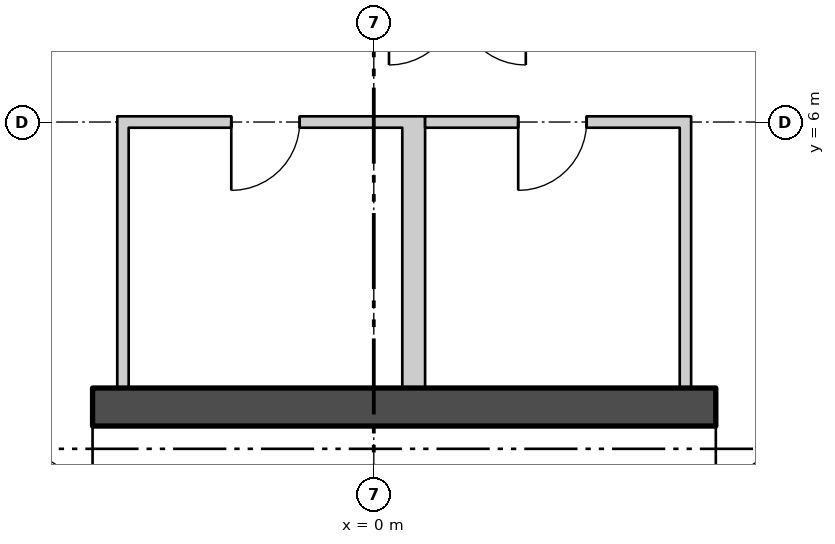
"""IFC4 building model, lengths in metres.
Left out: names, types, materials, properties, quantities, classifications, styles, units other than length and angle.
Written with IfcOpenShell. Run it as: python <this file> out.ifc"""

import sys

from ifc_helpers import new_model, si_unit, direction, frame, frame_2d, origin, place, context, subcontext, project, spatial, polyline, rectangle, outline, extrude, element, fill, save


model = new_model("IFC4")
c1 = context("Model", 3, precision=1e-05, world=origin(), true_north=direction((0.0, 1.0)))
c2 = subcontext(c1, "Body", "Model", "MODEL_VIEW")
j1 = project(units=[si_unit("LENGTHUNIT", "METRE"), si_unit("PLANEANGLEUNIT", "RADIAN")], contexts=[c1])
p1 = place(None, origin())
s1 = spatial("IfcSite", under=j1, at=p1, CompositionType="ELEMENT")
p2 = place(p1, origin())
s2 = spatial("IfcBuilding", under=s1, at=p2, CompositionType="ELEMENT")
p3 = place(p2, frame((0.0, 0.0, 139.8)))
s3 = spatial("IfcBuildingStorey", under=s2, at=p3, CompositionType="ELEMENT", Elevation=139.8)
p4 = place(p3, frame((4.36, -27.198, -0.18), z_axis=(0.0, 0.0, 1.0), x_axis=(0.500000335318, 0.866025210188, 0.0)))
e1 = element("IfcWall", 1, at=p4, inside=s3, PredefinedType="SOLIDWALL", context=c2, shape_type="SweptSolid", body=[
    extrude(outline(polyline([(-0.13, -0.225), (45.88, -0.225), (45.62, 0.225), (0.13, 0.225), (-0.13, -0.225)])), origin(), (0.0, 0.0, 1.0), 3.68),
])
p5 = place(p4, frame((1.425, 0.0, 1.08)))
e2 = element("IfcOpeningElement", 2, at=p5, cuts=e1, PredefinedType="OPENING", context=c2, shape_type="SweptSolid", body=[
    extrude(rectangle(XDim=2.4, YDim=2.0, at=frame_2d((1.2, 1.0))), frame((0.0, 0.235, 0.0), z_axis=(0.0, -1.0, 0.0), x_axis=(1.0, 0.0, 0.0)), (0.0, 0.0, 1.0), 0.47),
])
p6 = place(p4, frame((5.895, 0.0, 1.08)))
e3 = element("IfcOpeningElement", 3, at=p6, cuts=e1, PredefinedType="OPENING", context=c2, shape_type="SweptSolid", body=[
    extrude(rectangle(XDim=2.4, YDim=2.0, at=frame_2d((1.2, 1.0))), frame((0.0, 0.235, 0.0), z_axis=(0.0, -1.0, 0.0), x_axis=(1.0, 0.0, 0.0)), (0.0, 0.0, 1.0), 0.47),
])
p7 = place(p4, frame((10.403, 0.0, 1.08)))
e4 = element("IfcOpeningElement", 4, at=p7, cuts=e1, PredefinedType="OPENING", context=c2, shape_type="SweptSolid", body=[
    extrude(rectangle(XDim=2.4, YDim=2.0, at=frame_2d((1.2, 1.0))), frame((0.0, 0.235, 0.0), z_axis=(0.0, -1.0, 0.0), x_axis=(1.0, 0.0, 0.0)), (0.0, 0.0, 1.0), 0.47),
])
p8 = place(p4, frame((14.912, 0.0, 1.08)))
e5 = element("IfcOpeningElement", 5, at=p8, cuts=e1, PredefinedType="OPENING", context=c2, shape_type="SweptSolid", body=[
    extrude(rectangle(XDim=2.4, YDim=2.0, at=frame_2d((1.2, 1.0))), frame((0.0, 0.235, 0.0), z_axis=(0.0, -1.0, 0.0), x_axis=(1.0, 0.0, 0.0)), (0.0, 0.0, 1.0), 0.47),
])
p9 = place(p4, frame((19.421, 0.0, 1.08)))
e6 = element("IfcOpeningElement", 6, at=p9, cuts=e1, PredefinedType="OPENING", context=c2, shape_type="SweptSolid", body=[
    extrude(rectangle(XDim=2.4, YDim=2.0, at=frame_2d((1.2, 1.0))), frame((0.0, 0.235, 0.0), z_axis=(0.0, -1.0, 0.0), x_axis=(1.0, 0.0, 0.0)), (0.0, 0.0, 1.0), 0.47),
])
p10 = place(p4, frame((23.929, 0.0, 1.08)))
e7 = element("IfcOpeningElement", 7, at=p10, cuts=e1, PredefinedType="OPENING", context=c2, shape_type="SweptSolid", body=[
    extrude(rectangle(XDim=2.4, YDim=2.0, at=frame_2d((1.2, 1.0))), frame((0.0, 0.235, 0.0), z_axis=(0.0, -1.0, 0.0), x_axis=(1.0, 0.0, 0.0)), (0.0, 0.0, 1.0), 0.47),
])
p11 = place(p4, frame((37.455, 0.0, 1.08)))
e8 = element("IfcOpeningElement", 8, at=p11, cuts=e1, PredefinedType="OPENING", context=c2, shape_type="SweptSolid", body=[
    extrude(rectangle(XDim=2.4, YDim=2.0, at=frame_2d((1.2, 1.0))), frame((0.0, 0.235, 0.0), z_axis=(0.0, -1.0, 0.0), x_axis=(1.0, 0.0, 0.0)), (0.0, 0.0, 1.0), 0.47),
])
p12 = place(p4, frame((41.925, 0.0, 1.08)))
e9 = element("IfcOpeningElement", 9, at=p12, cuts=e1, PredefinedType="OPENING", context=c2, shape_type="SweptSolid", body=[
    extrude(rectangle(XDim=2.4, YDim=2.0, at=frame_2d((1.2, 1.0))), frame((0.0, 0.235, 0.0), z_axis=(0.0, -1.0, 0.0), x_axis=(1.0, 0.0, 0.0)), (0.0, 0.0, 1.0), 0.47),
])
p13 = place(p3, frame((-16.2, 2.25, 0.0), z_axis=(0.0, 0.0, 1.0), x_axis=(1.0, 0.0, 0.0)))
e10 = element("IfcWall", 10, at=p13, inside=s3, PredefinedType="SHEAR", context=c2, shape_type="SweptSolid", body=[
    extrude(rectangle(XDim=32.4, YDim=0.5, at=frame_2d((16.2, 0.0))), origin(), (0.0, 0.0, 1.0), 3.7),
])
p14 = place(p13, frame((10.7, 0.0, 0.0)))
e11 = element("IfcOpeningElement", 11, at=p14, cuts=e10, PredefinedType="OPENING", context=c2, shape_type="SweptSolid", body=[
    extrude(rectangle(XDim=1.8, YDim=2.4, at=frame_2d((0.9, 1.2))), frame((0.0, 0.26, 0.0), z_axis=(0.0, -1.0, 0.0), x_axis=(1.0, 0.0, 0.0)), (0.0, 0.0, 1.0), 0.52),
])
p15 = place(p13, frame((20.7, 0.0, 0.0)))
e12 = element("IfcOpeningElement", 12, at=p15, cuts=e10, PredefinedType="OPENING", context=c2, shape_type="SweptSolid", body=[
    extrude(rectangle(XDim=1.8, YDim=2.4, at=frame_2d((0.9, 1.2))), frame((0.0, 0.26, 0.0), z_axis=(0.0, -1.0, 0.0), x_axis=(1.0, 0.0, 0.0)), (0.0, 0.0, 1.0), 0.52),
])
for number, where, z_axis, x_axis in (
    (13, (-3.3, 2.5, 0.0), (0.0, 0.0, 1.0), (0.0, 1.0, 0.0)),
    (14, (0.45, 2.5, 0.0), (0.0, 0.0, 1.0), (0.0, 1.0, 0.0)),
):
    element("IfcWall", number, at=place(p3, frame(where, z_axis=z_axis, x_axis=x_axis)), inside=s3, PredefinedType="PARTITIONING", context=c2, shape_type="SweptSolid", body=[
        extrude(rectangle(XDim=3.575, YDim=0.15, at=frame_2d((1.788, 0.0))), origin(), (0.0, 0.0, 1.0), 3.7),
    ])
p16 = place(p3, frame((-3.225, 6.0, 0.0), z_axis=(0.0, 0.0, 1.0), x_axis=(1.0, 0.0, 0.0)))
e15 = element("IfcWall", 15, at=p16, inside=s3, PredefinedType="PARTITIONING", context=c2, shape_type="SweptSolid", body=[
    extrude(rectangle(XDim=3.6, YDim=0.15, at=frame_2d((1.8, 0.0))), origin(), (0.0, 0.0, 1.0), 3.7),
])
p17 = place(p16, frame((1.35, 0.0, 0.0)))
e16 = element("IfcOpeningElement", 16, at=p17, cuts=e15, PredefinedType="OPENING", context=c2, shape_type="SweptSolid", body=[
    extrude(rectangle(XDim=0.9, YDim=2.1, at=frame_2d((0.45, 1.05))), frame((0.0, 0.085, 0.0), z_axis=(0.0, -1.0, 0.0), x_axis=(1.0, 0.0, 0.0)), (0.0, 0.0, 1.0), 0.17),
])
for number, where, z_axis, x_axis in (
    (17, (0.6, 2.5, 0.0), (0.0, 0.0, 1.0), (0.0, 1.0, 0.0)),
    (18, (4.1, 2.5, 0.0), (0.0, 0.0, 1.0), (0.0, 1.0, 0.0)),
):
    element("IfcWall", number, at=place(p3, frame(where, z_axis=z_axis, x_axis=x_axis)), inside=s3, PredefinedType="PARTITIONING", context=c2, shape_type="SweptSolid", body=[
        extrude(rectangle(XDim=3.575, YDim=0.15, at=frame_2d((1.788, 0.0))), origin(), (0.0, 0.0, 1.0), 3.7),
    ])
p18 = place(p3, frame((0.675, 6.0, 0.0), z_axis=(0.0, 0.0, 1.0), x_axis=(1.0, 0.0, 0.0)))
e19 = element("IfcWall", 19, at=p18, inside=s3, PredefinedType="PARTITIONING", context=c2, shape_type="SweptSolid", body=[
    extrude(rectangle(XDim=3.35, YDim=0.15, at=frame_2d((1.675, 0.0))), origin(), (0.0, 0.0, 1.0), 3.7),
])
p19 = place(p18, frame((1.225, 0.0, 0.0)))
e20 = element("IfcOpeningElement", 20, at=p19, cuts=e19, PredefinedType="OPENING", context=c2, shape_type="SweptSolid", body=[
    extrude(rectangle(XDim=0.9, YDim=2.1, at=frame_2d((0.45, 1.05))), frame((0.0, 0.085, 0.0), z_axis=(0.0, -1.0, 0.0), x_axis=(1.0, 0.0, 0.0)), (0.0, 0.0, 1.0), 0.17),
])
p20 = place(p17, origin())
e21 = element("IfcDoor", 21, at=p20, inside=s3, OperationType="SINGLE_SWING_LEFT", PredefinedType="DOOR", context=c2, shape_type="SweptSolid", body=[
    extrude(rectangle(XDim=0.9, YDim=2.1, at=frame_2d((0.45, 1.05))), frame((0.0, 0.025, 0.0), z_axis=(0.0, -1.0, 0.0), x_axis=(1.0, 0.0, 0.0)), (0.0, 0.0, 1.0), 0.05),
])
fill(e16, e21)
p21 = place(p19, origin())
e22 = element("IfcDoor", 22, at=p21, inside=s3, OperationType="SINGLE_SWING_LEFT", PredefinedType="DOOR", context=c2, shape_type="SweptSolid", body=[
    extrude(rectangle(XDim=0.9, YDim=2.1, at=frame_2d((0.45, 1.05))), frame((0.0, 0.025, 0.0), z_axis=(0.0, -1.0, 0.0), x_axis=(1.0, 0.0, 0.0)), (0.0, 0.0, 1.0), 0.05),
])
fill(e20, e22)
p22 = place(p14, origin())
e23 = element("IfcDoor", 23, at=p22, inside=s3, OperationType="DOUBLE_DOOR_SINGLE_SWING", PredefinedType="DOOR", context=c2, shape_type="SweptSolid", body=[
    extrude(rectangle(XDim=1.8, YDim=2.4, at=frame_2d((0.9, 1.2))), frame((0.0, 0.025, 0.0), z_axis=(0.0, -1.0, 0.0), x_axis=(1.0, 0.0, 0.0)), (0.0, 0.0, 1.0), 0.05),
])
fill(e11, e23)
p23 = place(p15, origin())
e24 = element("IfcDoor", 24, at=p23, inside=s3, OperationType="DOUBLE_DOOR_SINGLE_SWING", PredefinedType="DOOR", context=c2, shape_type="SweptSolid", body=[
    extrude(rectangle(XDim=1.8, YDim=2.4, at=frame_2d((0.9, 1.2))), frame((0.0, 0.025, 0.0), z_axis=(0.0, -1.0, 0.0), x_axis=(1.0, 0.0, 0.0)), (0.0, 0.0, 1.0), 0.05),
])
fill(e12, e24)
save(model, sys.argv[1])
